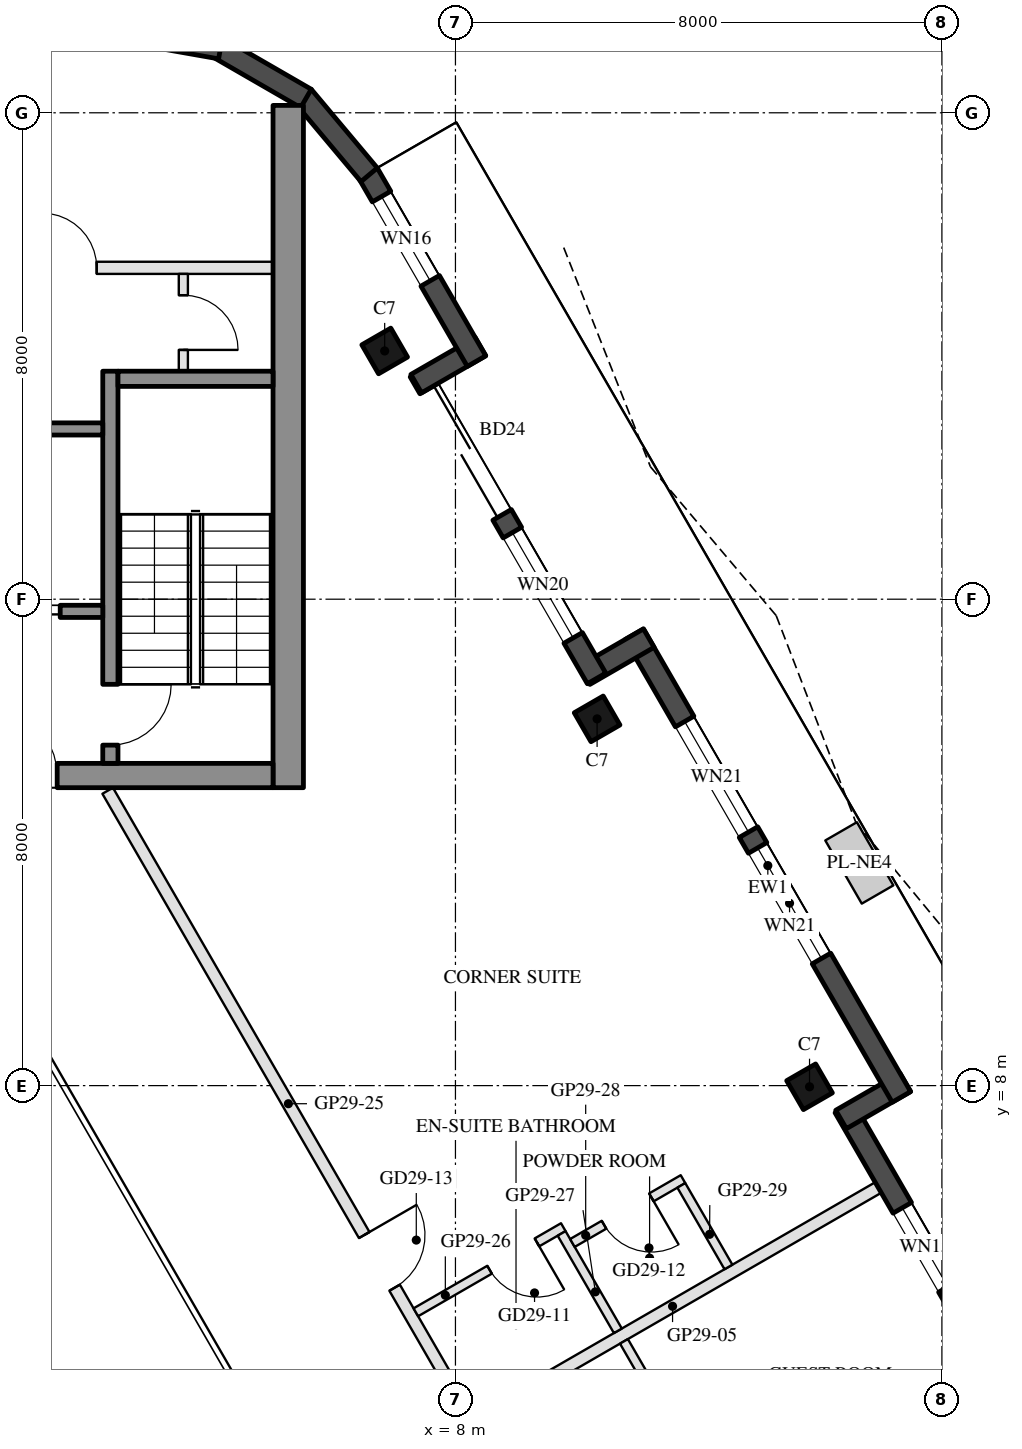
"""IFC4 building model, lengths in metres.
Left out: names, types, materials, properties, quantities, classifications, styles, units other than length and angle.
Written with IfcOpenShell. Run it as: python <this file> out.ifc"""

import sys

from ifc_helpers import new_model, si_unit, direction, frame, frame_2d, origin, origin_2d, place, context, subcontext, project, spatial, rectangle, hollow_rectangle, extrude, boolean, halfspace, element, fill, save


model = new_model("IFC4")
c1 = context("Model", 3, precision=1e-05, world=origin(), true_north=direction((0.0, 1.0)))
c2 = subcontext(c1, "Body", "Model", "MODEL_VIEW")
j1 = project(units=[si_unit("LENGTHUNIT", "METRE"), si_unit("PLANEANGLEUNIT", "RADIAN")], contexts=[c1])
p1 = place(None, origin())
s1 = spatial("IfcSite", under=j1, at=p1, CompositionType="ELEMENT")
p2 = place(p1, origin())
s2 = spatial("IfcBuilding", under=s1, at=p2, CompositionType="ELEMENT")
p3 = place(p2, frame((0.0, 0.0, 294.8)))
s3 = spatial("IfcBuildingStorey", under=s2, at=p3, CompositionType="ELEMENT", Elevation=294.8)
p4 = place(p3, frame((13.823, 7.981, 0.0), z_axis=(0.0, 0.0, 1.0), x_axis=(-0.5, 0.866025403784, 0.0)))
e1 = element("IfcColumn", 1, at=p4, inside=s3, PredefinedType="COLUMN", context=c2, shape_type="SweptSolid", body=[
    boolean("DIFFERENCE", extrude(hollow_rectangle(XDim=0.55, YDim=0.55, WallThickness=0.025, at=origin_2d()), origin(), (0.0, 0.0, 1.0), 3.7), halfspace(frame((0.0, 0.0, 3.668), z_axis=(0.0, 0.0, 1.0), x_axis=(1.0, 0.0, 0.0)), False)),
])
p5 = place(p3, frame((10.33, 14.032, 0.0), z_axis=(0.0, 0.0, 1.0), x_axis=(-0.5, 0.866025403784, 0.0)))
e2 = element("IfcColumn", 2, at=p5, inside=s3, PredefinedType="COLUMN", context=c2, shape_type="SweptSolid", body=[
    boolean("DIFFERENCE", extrude(hollow_rectangle(XDim=0.55, YDim=0.55, WallThickness=0.025, at=origin_2d()), origin(), (0.0, 0.0, 1.0), 3.7), halfspace(frame((0.0, 0.0, 3.666), z_axis=(0.0, 0.0, 1.0), x_axis=(1.0, 0.0, 0.0)), False)),
])
p6 = place(p3, frame((6.836, 20.083, 0.0), z_axis=(0.0, 0.0, 1.0), x_axis=(-0.5, 0.866025403784, 0.0)))
e3 = element("IfcColumn", 3, at=p6, inside=s3, PredefinedType="COLUMN", context=c2, shape_type="SweptSolid", body=[
    boolean("DIFFERENCE", extrude(hollow_rectangle(XDim=0.55, YDim=0.55, WallThickness=0.025, at=origin_2d()), origin(), (0.0, 0.0, 1.0), 3.7), halfspace(frame((0.0, 0.0, 3.66), z_axis=(0.0, 0.0, 1.0), x_axis=(1.0, 0.0, 0.0)), False)),
])
p7 = place(p3, frame((17.308, 2.595, 0.0), z_axis=(0.0, 0.0, 1.0), x_axis=(-0.500005339912, 0.866022320763, 0.0)))
e4 = element("IfcWall", 4, at=p7, inside=s3, PredefinedType="SOLIDWALL", context=c2, shape_type="SweptSolid", body=[
    extrude(rectangle(XDim=5.827, YDim=0.35, at=frame_2d((2.914, 0.0))), origin(), (0.0, 0.0, 1.0), 3.55),
])
p8 = place(p7, frame((0.32, 0.0, 0.0)))
e5 = element("IfcOpeningElement", 5, at=p8, cuts=e4, PredefinedType="OPENING", context=c2, shape_type="SweptSolid", body=[
    extrude(rectangle(XDim=1.8, YDim=2.4, at=frame_2d((0.9, 1.2))), frame((0.0, 0.185, 0.0), z_axis=(0.0, -1.0, 0.0), x_axis=(1.0, 0.0, 0.0)), (0.0, 0.0, 1.0), 0.37),
])
p9 = place(p7, frame((2.42, 0.0, 0.3)))
e6 = element("IfcOpeningElement", 6, at=p9, cuts=e4, PredefinedType="OPENING", context=c2, shape_type="SweptSolid", body=[
    extrude(rectangle(XDim=1.5, YDim=2.65, at=frame_2d((0.75, 1.325))), frame((0.0, 0.185, 0.0), z_axis=(0.0, -1.0, 0.0), x_axis=(1.0, 0.0, 0.0)), (0.0, 0.0, 1.0), 0.37),
])
p10 = place(p3, frame((14.342, 7.443, 0.0), z_axis=(0.0, 0.0, 1.0), x_axis=(0.866092288191, 0.499884134912, 0.0)))
e7 = element("IfcWall", 7, at=p10, inside=s3, PredefinedType="SOLIDWALL", context=c2, shape_type="SweptSolid", body=[
    extrude(rectangle(XDim=1.22, YDim=0.35, at=frame_2d((0.61, 0.0))), origin(), (0.0, 0.0, 1.0), 3.55),
])
p11 = place(p3, frame((15.334, 7.814, 0.0), z_axis=(0.0, 0.0, 1.0), x_axis=(-0.499999835575, 0.866025498715, 0.0)))
e8 = element("IfcWall", 8, at=p11, inside=s3, PredefinedType="SOLIDWALL", context=c2, shape_type="SweptSolid", body=[
    extrude(rectangle(XDim=8.787, YDim=0.35, at=frame_2d((4.394, 0.0))), origin(), (0.0, 0.0, 1.0), 3.55),
])
p12 = place(p11, frame((2.629, 0.0, 0.3)))
e9 = element("IfcOpeningElement", 9, at=p12, cuts=e8, PredefinedType="OPENING", context=c2, shape_type="SweptSolid", body=[
    extrude(rectangle(XDim=2.1, YDim=2.65, at=frame_2d((1.05, 1.325))), frame((0.0, 0.185, 0.0), z_axis=(0.0, -1.0, 0.0), x_axis=(1.0, 0.0, 0.0)), (0.0, 0.0, 1.0), 0.37),
])
p13 = place(p11, frame((5.029, 0.0, 0.3)))
e10 = element("IfcOpeningElement", 10, at=p13, cuts=e8, PredefinedType="OPENING", context=c2, shape_type="SweptSolid", body=[
    extrude(rectangle(XDim=2.1, YDim=2.65, at=frame_2d((1.05, 1.325))), frame((0.0, 0.185, 0.0), z_axis=(0.0, -1.0, 0.0), x_axis=(1.0, 0.0, 0.0)), (0.0, 0.0, 1.0), 0.37),
])
p14 = place(p3, frame((11.18, 15.36, 0.0), z_axis=(0.0, 0.0, 1.0), x_axis=(-0.866055662726, -0.499947586314, 0.0)))
e11 = element("IfcWall", 11, at=p14, inside=s3, PredefinedType="SOLIDWALL", context=c2, shape_type="SweptSolid", body=[
    extrude(rectangle(XDim=1.22, YDim=0.35, at=frame_2d((0.61, 0.0))), origin(), (0.0, 0.0, 1.0), 3.55),
])
p15 = place(p3, frame((10.321, 14.697, 0.0), z_axis=(0.0, 0.0, 1.0), x_axis=(-0.500005339912, 0.866022320763, 0.0)))
e12 = element("IfcWall", 12, at=p15, inside=s3, PredefinedType="SOLIDWALL", context=c2, shape_type="SweptSolid", body=[
    extrude(rectangle(XDim=5.827, YDim=0.35, at=frame_2d((2.914, 0.0))), origin(), (0.0, 0.0, 1.0), 3.55),
])
p16 = place(p15, frame((3.107, 0.0, 0.0)))
e13 = element("IfcOpeningElement", 13, at=p16, cuts=e12, PredefinedType="OPENING", context=c2, shape_type="SweptSolid", body=[
    extrude(rectangle(XDim=2.4, YDim=2.4, at=frame_2d((1.2, 1.2))), frame((0.0, 0.185, 0.0), z_axis=(0.0, -1.0, 0.0), x_axis=(1.0, 0.0, 0.0)), (0.0, 0.0, 1.0), 0.37),
])
p17 = place(p15, frame((0.77, 0.0, 0.3)))
e14 = element("IfcOpeningElement", 14, at=p17, cuts=e12, PredefinedType="OPENING", context=c2, shape_type="SweptSolid", body=[
    extrude(rectangle(XDim=2.0, YDim=2.65, at=frame_2d((1.0, 1.325))), frame((0.0, 0.185, 0.0), z_axis=(0.0, -1.0, 0.0), x_axis=(1.0, 0.0, 0.0)), (0.0, 0.0, 1.0), 0.37),
])
p18 = place(p3, frame((7.354, 19.545, 0.0), z_axis=(0.0, 0.0, 1.0), x_axis=(0.865955602162, 0.500120880472, 0.0)))
e15 = element("IfcWall", 15, at=p18, inside=s3, PredefinedType="SOLIDWALL", context=c2, shape_type="SweptSolid", body=[
    extrude(rectangle(XDim=1.22, YDim=0.35, at=frame_2d((0.61, 0.0))), origin(), (0.0, 0.0, 1.0), 3.55),
])
p19 = place(p3, frame((8.347, 19.916, 0.0), z_axis=(0.0, 0.0, 1.0), x_axis=(-0.500010763282, 0.866019189511, 0.0)))
e16 = element("IfcWall", 16, at=p19, inside=s3, PredefinedType="SOLIDWALL", context=c2, shape_type="SweptSolid", body=[
    extrude(rectangle(XDim=3.567, YDim=0.35, at=frame_2d((1.784, 0.0))), origin(), (0.0, 0.0, 1.0), 3.55),
])
p20 = place(p19, frame((1.525, 0.0, 0.3)))
e17 = element("IfcOpeningElement", 17, at=p20, cuts=e16, PredefinedType="OPENING", context=c2, shape_type="SweptSolid", body=[
    extrude(rectangle(XDim=1.6, YDim=2.65, at=frame_2d((0.8, 1.325))), frame((0.0, 0.185, 0.0), z_axis=(0.0, -1.0, 0.0), x_axis=(1.0, 0.0, 0.0)), (0.0, 0.0, 1.0), 0.37),
])
for number, where, z_axis, x_axis in (
    (18, (6.581, 22.98, 0.0), (0.0, 0.0, 1.0), (-0.643, 0.766, 0.0)),
    (19, (5.542, 24.236, 0.0), (0.0, 0.0, 1.0), (-0.866, 0.5, 0.0)),
    (20, (4.135, 25.059, 0.0), (0.0, 0.0, 1.0), (-0.985, 0.174, 0.0)),
):
    element("IfcWall", number, at=place(p3, frame(where, z_axis=z_axis, x_axis=x_axis)), inside=s3, PredefinedType="SOLIDWALL", context=c2, shape_type="SweptSolid", body=[
        extrude(rectangle(XDim=1.689, YDim=0.35, at=frame_2d((0.845, 0.0))), origin(), (0.0, 0.0, 1.0), 3.55),
    ])
p21 = place(p3, frame((5.25, 12.9, 0.0), z_axis=(0.0, 0.0, 1.0), x_axis=(0.0, 1.0, 0.0)))
e21 = element("IfcWall", 21, at=p21, inside=s3, PredefinedType="SHEAR", context=c2, shape_type="SweptSolid", body=[
    extrude(rectangle(XDim=11.222, YDim=0.5, at=frame_2d((5.611, 0.0))), origin(), (0.0, 0.0, 1.0), 3.5),
])
p22 = place(p3, frame((5.0, 13.1, 0.0), z_axis=(0.0, 0.0, 1.0), x_axis=(-1.0, 0.0, 0.0)))
e22 = element("IfcWall", 22, at=p22, inside=s3, PredefinedType="SHEAR", context=c2, shape_type="SweptSolid", body=[
    extrude(rectangle(XDim=10.0, YDim=0.4, at=frame_2d((5.0, 0.0))), origin(), (0.0, 0.0, 1.0), 3.5),
])
p23 = place(p22, frame((3.55, 0.0, 0.0)))
e23 = element("IfcOpeningElement", 23, at=p23, cuts=e22, PredefinedType="OPENING", context=c2, shape_type="SweptSolid", body=[
    extrude(rectangle(XDim=1.1, YDim=2.1, at=frame_2d((0.55, 1.05))), frame((0.0, 0.21, 0.0), z_axis=(0.0, -1.0, 0.0), x_axis=(1.0, 0.0, 0.0)), (0.0, 0.0, 1.0), 0.42),
])
p24 = place(p22, frame((5.85, 0.0, 0.0)))
e24 = element("IfcOpeningElement", 24, at=p24, cuts=e22, PredefinedType="OPENING", context=c2, shape_type="SweptSolid", body=[
    extrude(rectangle(XDim=1.4, YDim=2.1, at=frame_2d((0.7, 1.05))), frame((0.0, 0.21, 0.0), z_axis=(0.0, -1.0, 0.0), x_axis=(1.0, 0.0, 0.0)), (0.0, 0.0, 1.0), 0.42),
])
p25 = place(p3, frame((2.325, 13.3, 0.0), z_axis=(0.0, 0.0, 1.0), x_axis=(0.0, 1.0, 0.0)))
e25 = element("IfcWall", 25, at=p25, inside=s3, PredefinedType="SHEAR", context=c2, shape_type="SweptSolid", body=[
    extrude(rectangle(XDim=6.45, YDim=0.25, at=frame_2d((3.225, 0.0))), origin(), (0.0, 0.0, 1.0), 3.5),
])
p26 = place(p25, frame((0.3, 0.0, 0.0)))
e26 = element("IfcOpeningElement", 26, at=p26, cuts=e25, PredefinedType="OPENING", context=c2, shape_type="SweptSolid", body=[
    extrude(rectangle(XDim=1.0, YDim=2.1, at=frame_2d((0.5, 1.05))), frame((0.0, 0.135, 0.0), z_axis=(0.0, -1.0, 0.0), x_axis=(1.0, 0.0, 0.0)), (0.0, 0.0, 1.0), 0.27),
])
p27 = place(p3, frame((5.0, 19.625, 0.0), z_axis=(0.0, 0.0, 1.0), x_axis=(-1.0, 0.0, 0.0)))
e27 = element("IfcWall", 27, at=p27, inside=s3, PredefinedType="SHEAR", context=c2, shape_type="SweptSolid", body=[
    extrude(rectangle(XDim=2.55, YDim=0.25, at=frame_2d((1.275, 0.0))), origin(), (0.0, 0.0, 1.0), 3.5),
])
p28 = place(p3, frame((2.2, 18.8, 0.0), z_axis=(0.0, 0.0, 1.0), x_axis=(-1.0, 0.0, 0.0)))
e28 = element("IfcWall", 28, at=p28, inside=s3, PredefinedType="SHEAR", context=c2, shape_type="SweptSolid", body=[
    extrude(rectangle(XDim=2.8, YDim=0.2, at=frame_2d((1.4, 0.0))), origin(), (0.0, 0.0, 1.0), 3.5),
])
p29 = place(p3, frame((2.2, 15.8, 0.0), z_axis=(0.0, 0.0, 1.0), x_axis=(-1.0, 0.0, 0.0)))
e29 = element("IfcWall", 29, at=p29, inside=s3, PredefinedType="SHEAR", context=c2, shape_type="SweptSolid", body=[
    extrude(rectangle(XDim=2.8, YDim=0.2, at=frame_2d((1.4, 0.0))), origin(), (0.0, 0.0, 1.0), 3.5),
])
p30 = place(p29, frame((0.7, 0.0, 0.0)))
e30 = element("IfcOpeningElement", 30, at=p30, cuts=e29, PredefinedType="OPENING", context=c2, shape_type="SweptSolid", body=[
    extrude(rectangle(XDim=1.2, YDim=2.1, at=frame_2d((0.6, 1.05))), frame((0.0, 0.11, 0.0), z_axis=(0.0, -1.0, 0.0), x_axis=(1.0, 0.0, 0.0)), (0.0, 0.0, 1.0), 0.22),
])
p31 = place(p3, frame((5.0, 21.45, 0.0), z_axis=(0.0, 0.0, 1.0), x_axis=(-1.0, 0.0, 0.0)))
e31 = element("IfcWall", 31, at=p31, inside=s3, PredefinedType="PARTITIONING", context=c2, shape_type="SweptSolid", body=[
    extrude(rectangle(XDim=5.4, YDim=0.2, at=frame_2d((2.7, 0.0))), origin(), (0.0, 0.0, 1.0), 3.5),
])
p32 = place(p31, frame((2.9, 0.0, 0.0)))
e32 = element("IfcOpeningElement", 32, at=p32, cuts=e31, PredefinedType="OPENING", context=c2, shape_type="SweptSolid", body=[
    extrude(rectangle(XDim=0.9, YDim=2.1, at=frame_2d((0.45, 1.05))), frame((0.0, 0.11, 0.0), z_axis=(0.0, -1.0, 0.0), x_axis=(1.0, 0.0, 0.0)), (0.0, 0.0, 1.0), 0.22),
])
p33 = place(p3, frame((3.525, 19.75, 0.0), z_axis=(0.0, 0.0, 1.0), x_axis=(0.0, 1.0, 0.0)))
e33 = element("IfcWall", 33, at=p33, inside=s3, PredefinedType="PARTITIONING", context=c2, shape_type="SweptSolid", body=[
    extrude(rectangle(XDim=1.6, YDim=0.15, at=frame_2d((0.8, 0.0))), origin(), (0.0, 0.0, 1.0), 3.5),
])
p34 = place(p33, frame((0.35, 0.0, 0.0)))
e34 = element("IfcOpeningElement", 34, at=p34, cuts=e33, PredefinedType="OPENING", context=c2, shape_type="SweptSolid", body=[
    extrude(rectangle(XDim=0.9, YDim=2.1, at=frame_2d((0.45, 1.05))), frame((0.0, 0.085, 0.0), z_axis=(0.0, -1.0, 0.0), x_axis=(1.0, 0.0, 0.0)), (0.0, 0.0, 1.0), 0.17),
])
p35 = place(p3, frame((14.953, 6.324, 0.0), z_axis=(0.0, 0.0, 1.0), x_axis=(-0.866030491634, -0.499991187483, 0.0)))
e35 = element("IfcWall", 35, at=p35, inside=s3, PredefinedType="PARTITIONING", context=c2, shape_type="SweptSolid", body=[
    extrude(rectangle(XDim=7.812, YDim=0.2, at=frame_2d((3.906, 0.0))), origin(), (0.0, 0.0, 1.0), 3.1),
])
p36 = place(p3, frame((11.639, 2.29, 0.0), z_axis=(0.0, 0.0, 1.0), x_axis=(-0.500115958453, 0.865958444789, 0.0)))
e36 = element("IfcWall", 36, at=p36, inside=s3, PredefinedType="PARTITIONING", context=c2, shape_type="SweptSolid", body=[
    extrude(rectangle(XDim=1.736, YDim=0.15, at=frame_2d((0.868, 0.0))), origin(), (0.0, 0.0, 1.0), 3.05),
])
p37 = place(p3, frame((2.281, 12.85, 0.0), z_axis=(0.0, 0.0, 1.0), x_axis=(0.500002143212, -0.866024166397, 0.0)))
e37 = element("IfcWall", 37, at=p37, inside=s3, PredefinedType="PARTITIONING", context=c2, shape_type="SweptSolid", body=[
    extrude(rectangle(XDim=11.888, YDim=0.2, at=frame_2d((5.944, 0.0))), origin(), (0.0, 0.0, 1.0), 3.05),
])
p38 = place(p37, frame((8.438, 0.0, 0.0)))
e38 = element("IfcOpeningElement", 38, at=p38, cuts=e37, PredefinedType="OPENING", context=c2, shape_type="SweptSolid", body=[
    extrude(rectangle(XDim=1.0, YDim=2.1, at=frame_2d((0.5, 1.05))), frame((0.0, 0.11, 0.0), z_axis=(0.0, -1.0, 0.0), x_axis=(1.0, 0.0, 0.0)), (0.0, 0.0, 1.0), 0.22),
])
p39 = place(p3, frame((9.774, 5.672, 0.0), z_axis=(0.0, 0.0, 1.0), x_axis=(-0.866056369097, -0.49994636267, 0.0)))
e39 = element("IfcWall", 39, at=p39, inside=s3, PredefinedType="PARTITIONING", context=c2, shape_type="SweptSolid", body=[
    extrude(rectangle(XDim=2.8, YDim=0.15, at=frame_2d((1.4, 0.0))), origin(), (0.0, 0.0, 1.0), 3.05),
])
p40 = place(p39, frame((0.5, 0.0, 0.0)))
e40 = element("IfcOpeningElement", 40, at=p40, cuts=e39, PredefinedType="OPENING", context=c2, shape_type="SweptSolid", body=[
    extrude(rectangle(XDim=0.9, YDim=2.1, at=frame_2d((0.45, 1.05))), frame((0.0, 0.085, 0.0), z_axis=(0.0, -1.0, 0.0), x_axis=(1.0, 0.0, 0.0)), (0.0, 0.0, 1.0), 0.17),
])
p41 = place(p3, frame((10.671, 3.967, 0.0), z_axis=(0.0, 0.0, 1.0), x_axis=(-0.500042316284, 0.866000971088, 0.0)))
e41 = element("IfcWall", 41, at=p41, inside=s3, PredefinedType="PARTITIONING", context=c2, shape_type="SweptSolid", body=[
    extrude(rectangle(XDim=1.85, YDim=0.15, at=frame_2d((0.925, 0.0))), origin(), (0.0, 0.0, 1.0), 3.05),
])
p42 = place(p3, frame((11.742, 6.462, 0.0), z_axis=(0.0, 0.0, 1.0), x_axis=(-0.866009402589, -0.500027713859, 0.0)))
e42 = element("IfcWall", 42, at=p42, inside=s3, PredefinedType="PARTITIONING", context=c2, shape_type="SweptSolid", body=[
    extrude(rectangle(XDim=2.1, YDim=0.15, at=frame_2d((1.05, 0.0))), origin(), (0.0, 0.0, 1.0), 3.55),
])
p43 = place(p42, frame((0.6, 0.0, 0.0)))
e43 = element("IfcOpeningElement", 43, at=p43, cuts=e42, PredefinedType="OPENING", context=c2, shape_type="SweptSolid", body=[
    extrude(rectangle(XDim=0.9, YDim=2.1, at=frame_2d((0.45, 1.05))), frame((0.0, 0.085, 0.0), z_axis=(0.0, -1.0, 0.0), x_axis=(1.0, 0.0, 0.0)), (0.0, 0.0, 1.0), 0.17),
])
p44 = place(p3, frame((12.49, 5.017, 0.0), z_axis=(0.0, 0.0, 1.0), x_axis=(-0.499967891604, 0.866043940782, 0.0)))
e44 = element("IfcWall", 44, at=p44, inside=s3, PredefinedType="PARTITIONING", context=c2, shape_type="SweptSolid", body=[
    extrude(rectangle(XDim=1.55, YDim=0.15, at=frame_2d((0.775, 0.0))), origin(), (0.0, 0.0, 1.0), 3.55),
])
p45 = place(p9, origin())
e45 = element("IfcWindow", 45, at=p45, inside=s3, PartitioningType="SINGLE_PANEL", PredefinedType="WINDOW", context=c2, shape_type="SweptSolid", body=[
    extrude(rectangle(XDim=1.5, YDim=2.65, at=frame_2d((0.75, 1.325))), frame((0.0, 0.03, 0.0), z_axis=(0.0, -1.0, 0.0), x_axis=(1.0, 0.0, 0.0)), (0.0, 0.0, 1.0), 0.06),
])
fill(e6, e45)
p46 = place(p12, origin())
e46 = element("IfcWindow", 46, at=p46, inside=s3, PartitioningType="SINGLE_PANEL", PredefinedType="WINDOW", context=c2, shape_type="SweptSolid", body=[
    extrude(rectangle(XDim=2.1, YDim=2.65, at=frame_2d((1.05, 1.325))), frame((0.0, 0.03, 0.0), z_axis=(0.0, -1.0, 0.0), x_axis=(1.0, 0.0, 0.0)), (0.0, 0.0, 1.0), 0.06),
])
fill(e9, e46)
p47 = place(p13, origin())
e47 = element("IfcWindow", 47, at=p47, inside=s3, PartitioningType="SINGLE_PANEL", PredefinedType="WINDOW", context=c2, shape_type="SweptSolid", body=[
    extrude(rectangle(XDim=2.1, YDim=2.65, at=frame_2d((1.05, 1.325))), frame((0.0, 0.03, 0.0), z_axis=(0.0, -1.0, 0.0), x_axis=(1.0, 0.0, 0.0)), (0.0, 0.0, 1.0), 0.06),
])
fill(e10, e47)
p48 = place(p16, frame((2.4, 0.0, 0.0), z_axis=(0.0, 0.0, 1.0), x_axis=(-1.0, 0.0, 0.0)))
e48 = element("IfcDoor", 48, at=p48, inside=s3, OperationType="SLIDING_TO_LEFT", PredefinedType="DOOR", context=c2, shape_type="SweptSolid", body=[
    extrude(rectangle(XDim=2.4, YDim=2.4, at=frame_2d((1.2, 1.2))), frame((0.0, 0.025, 0.0), z_axis=(0.0, -1.0, 0.0), x_axis=(1.0, 0.0, 0.0)), (0.0, 0.0, 1.0), 0.05),
])
fill(e13, e48)
p49 = place(p17, origin())
e49 = element("IfcWindow", 49, at=p49, inside=s3, PartitioningType="SINGLE_PANEL", PredefinedType="WINDOW", context=c2, shape_type="SweptSolid", body=[
    extrude(rectangle(XDim=2.0, YDim=2.65, at=frame_2d((1.0, 1.325))), frame((0.0, 0.03, 0.0), z_axis=(0.0, -1.0, 0.0), x_axis=(1.0, 0.0, 0.0)), (0.0, 0.0, 1.0), 0.06),
])
fill(e14, e49)
p50 = place(p20, origin())
e50 = element("IfcWindow", 50, at=p50, inside=s3, PartitioningType="SINGLE_PANEL", PredefinedType="WINDOW", context=c2, shape_type="SweptSolid", body=[
    extrude(rectangle(XDim=1.6, YDim=2.65, at=frame_2d((0.8, 1.325))), frame((0.0, 0.03, 0.0), z_axis=(0.0, -1.0, 0.0), x_axis=(1.0, 0.0, 0.0)), (0.0, 0.0, 1.0), 0.06),
])
fill(e17, e50)
p51 = place(p30, origin())
e51 = element("IfcDoor", 51, at=p51, inside=s3, OperationType="DOUBLE_DOOR_SLIDING", PredefinedType="DOOR", context=c2, shape_type="SweptSolid", body=[
    extrude(rectangle(XDim=1.2, YDim=2.1, at=frame_2d((0.6, 1.05))), frame((0.0, 0.025, 0.0), z_axis=(0.0, -1.0, 0.0), x_axis=(1.0, 0.0, 0.0)), (0.0, 0.0, 1.0), 0.05),
])
fill(e30, e51)
p52 = place(p34, frame((0.9, 0.0, 0.0), z_axis=(0.0, 0.0, 1.0), x_axis=(-1.0, 0.0, 0.0)))
e52 = element("IfcDoor", 52, at=p52, inside=s3, OperationType="SINGLE_SWING_RIGHT", PredefinedType="DOOR", context=c2, shape_type="SweptSolid", body=[
    extrude(rectangle(XDim=0.9, YDim=2.1, at=frame_2d((0.45, 1.05))), frame((0.0, 0.025, 0.0), z_axis=(0.0, -1.0, 0.0), x_axis=(1.0, 0.0, 0.0)), (0.0, 0.0, 1.0), 0.05),
])
fill(e34, e52)
p53 = place(p32, frame((0.9, 0.0, 0.0), z_axis=(0.0, 0.0, 1.0), x_axis=(-1.0, 0.0, 0.0)))
e53 = element("IfcDoor", 53, at=p53, inside=s3, OperationType="SINGLE_SWING_LEFT", PredefinedType="DOOR", context=c2, shape_type="SweptSolid", body=[
    extrude(rectangle(XDim=0.9, YDim=2.1, at=frame_2d((0.45, 1.05))), frame((0.0, 0.025, 0.0), z_axis=(0.0, -1.0, 0.0), x_axis=(1.0, 0.0, 0.0)), (0.0, 0.0, 1.0), 0.05),
])
fill(e32, e53)
p54 = place(p23, frame((1.1, 0.0, 0.0), z_axis=(0.0, 0.0, 1.0), x_axis=(-1.0, 0.0, 0.0)))
e54 = element("IfcDoor", 54, at=p54, inside=s3, OperationType="SINGLE_SWING_LEFT", PredefinedType="DOOR", context=c2, shape_type="SweptSolid", body=[
    extrude(rectangle(XDim=1.1, YDim=2.1, at=frame_2d((0.55, 1.05))), frame((0.0, 0.025, 0.0), z_axis=(0.0, -1.0, 0.0), x_axis=(1.0, 0.0, 0.0)), (0.0, 0.0, 1.0), 0.05),
])
fill(e23, e54)
p55 = place(p26, frame((1.0, 0.0, 0.0), z_axis=(0.0, 0.0, 1.0), x_axis=(-1.0, 0.0, 0.0)))
e55 = element("IfcDoor", 55, at=p55, inside=s3, OperationType="SINGLE_SWING_LEFT", PredefinedType="DOOR", context=c2, shape_type="SweptSolid", body=[
    extrude(rectangle(XDim=1.0, YDim=2.1, at=frame_2d((0.5, 1.05))), frame((0.0, 0.025, 0.0), z_axis=(0.0, -1.0, 0.0), x_axis=(1.0, 0.0, 0.0)), (0.0, 0.0, 1.0), 0.05),
])
fill(e26, e55)
p56 = place(p40, origin())
e56 = element("IfcDoor", 56, at=p56, inside=s3, OperationType="SINGLE_SWING_LEFT", PredefinedType="DOOR", context=c2, shape_type="SweptSolid", body=[
    extrude(rectangle(XDim=0.9, YDim=2.1, at=frame_2d((0.45, 1.05))), frame((0.0, 0.025, 0.0), z_axis=(0.0, -1.0, 0.0), x_axis=(1.0, 0.0, 0.0)), (0.0, 0.0, 1.0), 0.05),
])
fill(e40, e56)
p57 = place(p43, origin())
e57 = element("IfcDoor", 57, at=p57, inside=s3, OperationType="SINGLE_SWING_LEFT", PredefinedType="DOOR", context=c2, shape_type="SweptSolid", body=[
    extrude(rectangle(XDim=0.9, YDim=2.1, at=frame_2d((0.45, 1.05))), frame((0.0, 0.025, 0.0), z_axis=(0.0, -1.0, 0.0), x_axis=(1.0, 0.0, 0.0)), (0.0, 0.0, 1.0), 0.05),
])
fill(e43, e57)
p58 = place(p38, origin())
e58 = element("IfcDoor", 58, at=p58, inside=s3, OperationType="SINGLE_SWING_LEFT", PredefinedType="DOOR", context=c2, shape_type="SweptSolid", body=[
    extrude(rectangle(XDim=1.0, YDim=2.1, at=frame_2d((0.5, 1.05))), frame((0.0, 0.025, 0.0), z_axis=(0.0, -1.0, 0.0), x_axis=(1.0, 0.0, 0.0)), (0.0, 0.0, 1.0), 0.05),
])
fill(e38, e58)
save(model, sys.argv[1])
